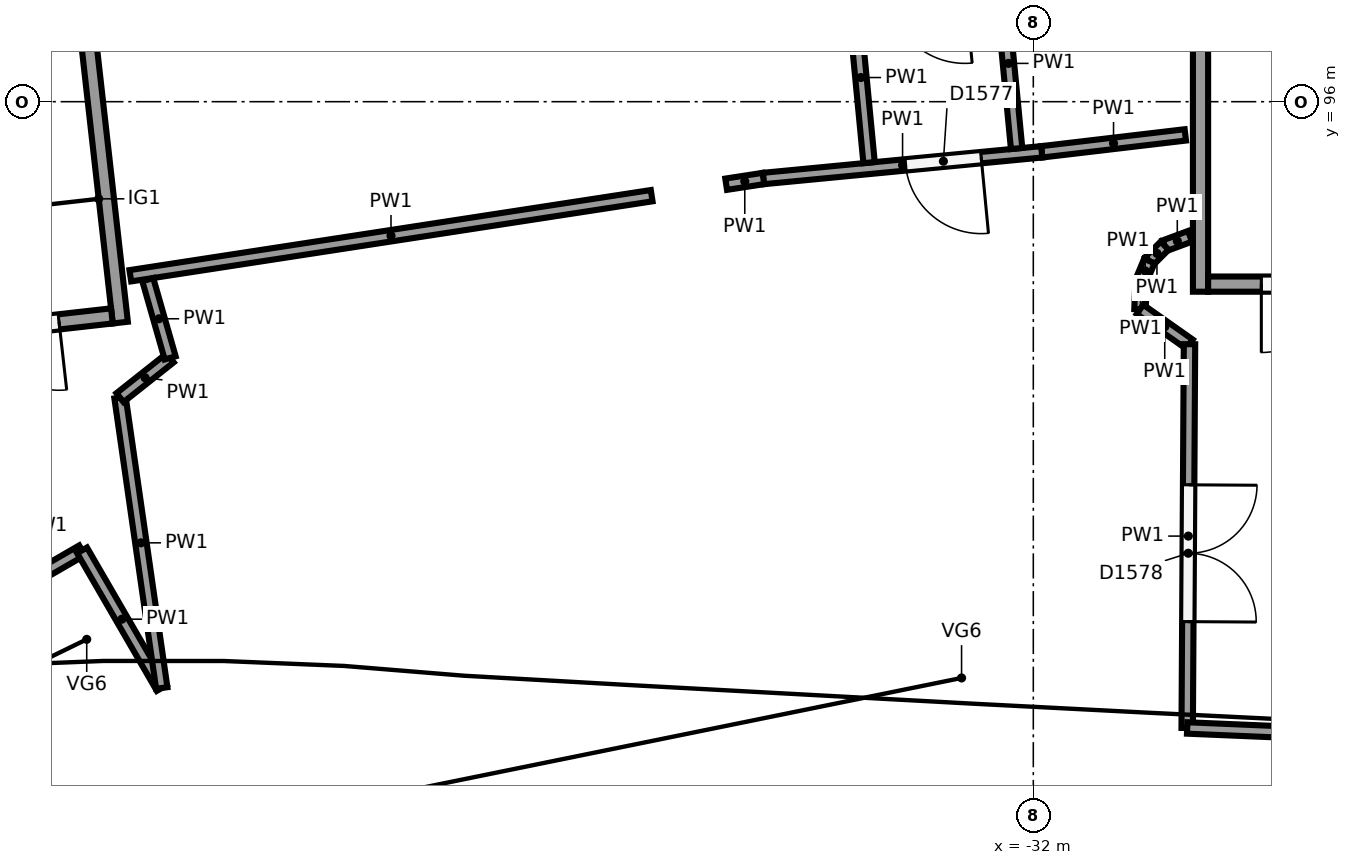
"""IFC4 building model, lengths in metres.
Left out: names, types, materials, properties, quantities, classifications, styles, units other than length and angle.
Written with IfcOpenShell. Run it as: python <this file> out.ifc"""

import sys

from ifc_helpers import new_model, si_unit, direction, frame, frame_2d, origin, origin_2d, place, context, subcontext, project, spatial, rectangle, circle, extrude, element, fill, save


model = new_model("IFC4")
c1 = context("Model", 3, precision=1e-05, world=origin(), true_north=direction((0.0, 1.0)))
c2 = subcontext(c1, "Body", "Model", "MODEL_VIEW")
j1 = project(units=[si_unit("LENGTHUNIT", "METRE"), si_unit("PLANEANGLEUNIT", "RADIAN")], contexts=[c1])
p1 = place(None, origin())
s1 = spatial("IfcSite", under=j1, at=p1, CompositionType="ELEMENT")
p2 = place(p1, origin())
s2 = spatial("IfcBuilding", under=s1, at=p2, CompositionType="ELEMENT")
p3 = place(p2, frame((0.0, 0.0, 24.0)))
s3 = spatial("IfcBuildingStorey", under=s2, at=p3, CompositionType="ELEMENT", Elevation=24.0)
p4 = place(p3, frame((-34.531, 89.912, 0.0), z_axis=(0.0, 0.0, 1.0), x_axis=(1.0, 0.0, 0.0)))
e1 = element("IfcColumn", 1, at=p4, inside=s3, PredefinedType="COLUMN", context=c2, shape_type="SweptSolid", body=[
    extrude(circle(Radius=0.45, at=origin_2d()), origin(), (0.0, 0.0, 1.0), 3.9),
])
p5 = place(p3, frame((-44.683, 91.091, 0.0), z_axis=(0.0, 0.0, 1.0), x_axis=(1.0, 0.0, 0.0)))
e2 = element("IfcColumn", 2, at=p5, inside=s3, PredefinedType="COLUMN", context=c2, shape_type="SweptSolid", body=[
    extrude(circle(Radius=0.55, at=origin_2d()), origin(), (0.0, 0.0, 1.0), 6.0),
])
p6 = place(p3, frame((-29.8, 102.3, 0.0), z_axis=(0.0, 0.0, 1.0), x_axis=(0.0, -1.0, 0.0)))
e3 = element("IfcWall", 3, at=p6, inside=s3, PredefinedType="SHEAR", context=c2, shape_type="SweptSolid", body=[
    extrude(rectangle(XDim=8.8, YDim=0.2, at=frame_2d((4.4, 0.0))), origin(), (0.0, 0.0, 1.0), 5.75),
])
p7 = place(p3, frame((-26.5, 93.6, 0.0), z_axis=(0.0, 0.0, 1.0), x_axis=(-1.0, 0.0, 0.0)))
e4 = element("IfcWall", 4, at=p7, inside=s3, PredefinedType="SHEAR", context=c2, shape_type="SweptSolid", body=[
    extrude(rectangle(XDim=3.2, YDim=0.2, at=frame_2d((1.6, 0.0))), origin(), (0.0, 0.0, 1.0), 5.75),
])
p8 = place(p7, frame((0.7, 0.0, 0.0)))
e5 = element("IfcOpeningElement", 5, at=p8, cuts=e4, PredefinedType="OPENING", context=c2, shape_type="SweptSolid", body=[
    extrude(rectangle(XDim=1.8, YDim=2.1, at=frame_2d((0.9, 1.05))), frame((0.0, 0.11, 0.0), z_axis=(0.0, -1.0, 0.0), x_axis=(1.0, 0.0, 0.0)), (0.0, 0.0, 1.0), 0.22),
])
p9 = place(p3, frame((-44.863, 100.646, 0.0), z_axis=(0.0, 0.0, 1.0), x_axis=(0.111951003472, -0.993713727802, 0.0)))
e6 = element("IfcWall", 6, at=p9, inside=s3, PredefinedType="SHEAR", context=c2, shape_type="SweptSolid", body=[
    extrude(rectangle(XDim=7.6, YDim=0.2, at=frame_2d((3.8, 0.0))), origin(), (0.0, 0.0, 1.0), 5.75),
])
p10 = place(p3, frame((-44.123, 93.182, 0.0), z_axis=(0.0, 0.0, 1.0), x_axis=(-0.993717005286, -0.11192190762, 0.0)))
e7 = element("IfcWall", 7, at=p10, inside=s3, PredefinedType="SHEAR", context=c2, shape_type="SweptSolid", body=[
    extrude(rectangle(XDim=3.2, YDim=0.2, at=frame_2d((1.6, 0.0))), origin(), (0.0, 0.0, 1.0), 5.75),
])
p11 = place(p10, frame((0.7, 0.0, 0.0)))
e8 = element("IfcOpeningElement", 8, at=p11, cuts=e7, PredefinedType="OPENING", context=c2, shape_type="SweptSolid", body=[
    extrude(rectangle(XDim=1.8, YDim=2.1, at=frame_2d((0.9, 1.05))), frame((0.0, 0.11, 0.0), z_axis=(0.0, -1.0, 0.0), x_axis=(1.0, 0.0, 0.0)), (0.0, 0.0, 1.0), 0.22),
])
p12 = place(p3, frame((-30.0, 95.563, 0.0), z_axis=(0.0, 0.0, 1.0), x_axis=(-0.993124293788, -0.117064670536, 0.0)))
e9 = element("IfcWall", 9, at=p12, inside=s3, PredefinedType="PARTITIONING", context=c2, shape_type="SweptSolid", body=[
    extrude(rectangle(XDim=1.902, YDim=0.15, at=frame_2d((0.951, 0.0))), origin(), (0.0, 0.0, 1.0), 5.4),
])
p13 = place(p3, frame((-31.889, 95.34, 0.0), z_axis=(0.0, 0.0, 1.0), x_axis=(-0.995436828667, -0.095422849118, 0.0)))
e10 = element("IfcWall", 10, at=p13, inside=s3, PredefinedType="PARTITIONING", context=c2, shape_type="SweptSolid", body=[
    extrude(rectangle(XDim=3.679, YDim=0.15, at=frame_2d((1.84, 0.0))), origin(), (0.0, 0.0, 1.0), 5.4),
])
p14 = place(p13, frame((0.8, 0.0, 0.0)))
e11 = element("IfcOpeningElement", 11, at=p14, cuts=e10, PredefinedType="OPENING", context=c2, shape_type="SweptSolid", body=[
    extrude(rectangle(XDim=1.0, YDim=2.1, at=frame_2d((0.5, 1.05))), frame((0.0, 0.085, 0.0), z_axis=(0.0, -1.0, 0.0), x_axis=(1.0, 0.0, 0.0)), (0.0, 0.0, 1.0), 0.17),
])
p15 = place(p3, frame((-35.551, 94.989, 0.0), z_axis=(0.0, 0.0, 1.0), x_axis=(-0.988428563691, -0.151687093979, 0.0)))
e12 = element("IfcWall", 12, at=p15, inside=s3, PredefinedType="PARTITIONING", context=c2, shape_type="SweptSolid", body=[
    extrude(rectangle(XDim=0.496, YDim=0.15, at=frame_2d((0.248, 0.0))), origin(), (0.0, 0.0, 1.0), 5.4),
])
p16 = place(p3, frame((-37.021, 94.763, 0.0), z_axis=(0.0, 0.0, 1.0), x_axis=(-0.988411114545, -0.151800753106, 0.0)))
e13 = element("IfcWall", 13, at=p16, inside=s3, PredefinedType="PARTITIONING", context=c2, shape_type="SweptSolid", body=[
    extrude(rectangle(XDim=6.94, YDim=0.15, at=frame_2d((3.47, 0.0))), origin(), (0.0, 0.0, 1.0), 5.4),
])
p17 = place(p3, frame((-29.938, 94.229, 0.0), z_axis=(0.0, 0.0, 1.0), x_axis=(-0.937674325327, -0.347515265308, 0.0)))
e14 = element("IfcWall", 14, at=p17, inside=s3, PredefinedType="PARTITIONING", context=c2, shape_type="SweptSolid", body=[
    extrude(rectangle(XDim=0.356, YDim=0.15, at=frame_2d((0.178, 0.0))), origin(), (0.0, 0.0, 1.0), 5.4),
])
p18 = place(p3, frame((-30.272, 94.105, 0.0), z_axis=(0.0, 0.0, 1.0), x_axis=(-0.707534941396, -0.706678361564, 0.0)))
e15 = element("IfcWall", 15, at=p18, inside=s3, PredefinedType="PARTITIONING", context=c2, shape_type="SweptSolid", body=[
    extrude(rectangle(XDim=0.285, YDim=0.15, at=frame_2d((0.143, 0.0))), origin(), (0.0, 0.0, 1.0), 5.4),
])
p19 = place(p3, frame((-30.474, 93.904, 0.0), z_axis=(0.0, 0.0, 1.0), x_axis=(-0.382275228123, -0.924048510611, 0.0)))
e16 = element("IfcWall", 16, at=p19, inside=s3, PredefinedType="PARTITIONING", context=c2, shape_type="SweptSolid", body=[
    extrude(rectangle(XDim=0.282, YDim=0.15, at=frame_2d((0.141, 0.0))), origin(), (0.0, 0.0, 1.0), 5.4),
])
p20 = place(p3, frame((-30.582, 93.643, 0.0), z_axis=(0.0, 0.0, 1.0), x_axis=(-0.038982051143, -0.999239910977, 0.0)))
e17 = element("IfcWall", 17, at=p20, inside=s3, PredefinedType="PARTITIONING", context=c2, shape_type="SweptSolid", body=[
    extrude(rectangle(XDim=0.376, YDim=0.15, at=frame_2d((0.188, 0.0))), origin(), (0.0, 0.0, 1.0), 5.4),
])
p21 = place(p3, frame((-30.596, 93.268, 0.0), z_axis=(0.0, 0.0, 1.0), x_axis=(0.817630031149, -0.575743981439, 0.0)))
e18 = element("IfcWall", 18, at=p21, inside=s3, PredefinedType="PARTITIONING", context=c2, shape_type="SweptSolid", body=[
    extrude(rectangle(XDim=0.796, YDim=0.15, at=frame_2d((0.398, 0.0))), origin(), (0.0, 0.0, 1.0), 5.4),
])
p22 = place(p3, frame((-29.945, 92.809, 0.0), z_axis=(0.0, 0.0, 1.0), x_axis=(-0.005947670427, -0.999982312452, 0.0)))
e19 = element("IfcWall", 19, at=p22, inside=s3, PredefinedType="PARTITIONING", context=c2, shape_type="SweptSolid", body=[
    extrude(rectangle(XDim=5.049, YDim=0.15, at=frame_2d((2.524, 0.0))), origin(), (0.0, 0.0, 1.0), 5.4),
])
p23 = place(p22, frame((1.85, 0.0, 0.0)))
e20 = element("IfcOpeningElement", 20, at=p23, cuts=e19, PredefinedType="OPENING", context=c2, shape_type="SweptSolid", body=[
    extrude(rectangle(XDim=1.8, YDim=2.1, at=frame_2d((0.9, 1.05))), frame((0.0, 0.085, 0.0), z_axis=(0.0, -1.0, 0.0), x_axis=(1.0, 0.0, 0.0)), (0.0, 0.0, 1.0), 0.17),
])
p24 = place(p3, frame((-29.975, 87.76, 0.0), z_axis=(0.0, 0.0, 1.0), x_axis=(0.999118137172, -0.041987474002, 0.0)))
e21 = element("IfcWall", 21, at=p24, inside=s3, PredefinedType="PARTITIONING", context=c2, shape_type="SweptSolid", body=[
    extrude(rectangle(XDim=12.49, YDim=0.15, at=frame_2d((6.245, 0.0))), origin(), (0.0, 0.0, 1.0), 5.4),
])
p25 = place(p3, frame((-45.468, 89.547, 0.0), z_axis=(0.0, 0.0, 1.0), x_axis=(0.865760373594, 0.500458765049, 0.0)))
e22 = element("IfcWall", 22, at=p25, inside=s3, PredefinedType="PARTITIONING", context=c2, shape_type="SweptSolid", body=[
    extrude(rectangle(XDim=1.1, YDim=0.15, at=frame_2d((0.55, 0.0))), origin(), (0.0, 0.0, 1.0), 5.4),
])
p26 = place(p3, frame((-44.516, 90.097, 0.0), z_axis=(0.0, 0.0, 1.0), x_axis=(0.501068461494, -0.865407647815, 0.0)))
e23 = element("IfcWall", 23, at=p26, inside=s3, PredefinedType="PARTITIONING", context=c2, shape_type="SweptSolid", body=[
    extrude(rectangle(XDim=2.093, YDim=0.15, at=frame_2d((1.046, 0.0))), origin(), (0.0, 0.0, 1.0), 5.4),
])
p27 = place(p3, frame((-43.467, 88.286, 0.0), z_axis=(0.0, 0.0, 1.0), x_axis=(-0.14226260917, 0.989828949886, 0.0)))
e24 = element("IfcWall", 24, at=p27, inside=s3, PredefinedType="PARTITIONING", context=c2, shape_type="SweptSolid", body=[
    extrude(rectangle(XDim=3.86, YDim=0.15, at=frame_2d((1.93, 0.0))), origin(), (0.0, 0.0, 1.0), 5.4),
])
p28 = place(p3, frame((-44.016, 92.106, 0.0), z_axis=(0.0, 0.0, 1.0), x_axis=(0.783745876513, 0.621081637991, 0.0)))
e25 = element("IfcWall", 25, at=p28, inside=s3, PredefinedType="PARTITIONING", context=c2, shape_type="SweptSolid", body=[
    extrude(rectangle(XDim=0.842, YDim=0.15, at=frame_2d((0.421, 0.0))), origin(), (0.0, 0.0, 1.0), 5.4),
])
p29 = place(p3, frame((-43.356, 92.629, 0.0), z_axis=(0.0, 0.0, 1.0), x_axis=(-0.27523308246, 0.961377527467, 0.0)))
e26 = element("IfcWall", 26, at=p29, inside=s3, PredefinedType="PARTITIONING", context=c2, shape_type="SweptSolid", body=[
    extrude(rectangle(XDim=1.071, YDim=0.15, at=frame_2d((0.535, 0.0))), origin(), (0.0, 0.0, 1.0), 5.4),
])
for number, where, z_axis, x_axis in (
    (27, (-32.22, 95.384, 0.0), (0.0, 0.0, 1.0), (-0.095, 0.995, 0.0)),
    (28, (-34.161, 95.198, 0.0), (0.0, 0.0, 1.0), (-0.095, 0.995, 0.0)),
):
    element("IfcWall", number, at=place(p3, frame(where, z_axis=z_axis, x_axis=x_axis)), inside=s3, PredefinedType="PARTITIONING", context=c2, shape_type="SweptSolid", body=[
        extrude(rectangle(XDim=2.25, YDim=0.15, at=frame_2d((1.125, 0.0))), origin(), (0.0, 0.0, 1.0), 5.4),
    ])
p30 = place(p8, origin())
e29 = element("IfcDoor", 29, at=p30, inside=s3, OperationType="DOUBLE_DOOR_SINGLE_SWING", PredefinedType="DOOR", context=c2, shape_type="SweptSolid", body=[
    extrude(rectangle(XDim=1.8, YDim=2.1, at=frame_2d((0.9, 1.05))), frame((0.0, 0.025, 0.0), z_axis=(0.0, -1.0, 0.0), x_axis=(1.0, 0.0, 0.0)), (0.0, 0.0, 1.0), 0.05),
])
fill(e5, e29)
p31 = place(p11, origin())
e30 = element("IfcDoor", 30, at=p31, inside=s3, OperationType="DOUBLE_DOOR_SINGLE_SWING", PredefinedType="DOOR", context=c2, shape_type="SweptSolid", body=[
    extrude(rectangle(XDim=1.8, YDim=2.1, at=frame_2d((0.9, 1.05))), frame((0.0, 0.025, 0.0), z_axis=(0.0, -1.0, 0.0), x_axis=(1.0, 0.0, 0.0)), (0.0, 0.0, 1.0), 0.05),
])
fill(e8, e30)
p32 = place(p14, origin())
e31 = element("IfcDoor", 31, at=p32, inside=s3, OperationType="SINGLE_SWING_LEFT", PredefinedType="DOOR", context=c2, shape_type="SweptSolid", body=[
    extrude(rectangle(XDim=1.0, YDim=2.1, at=frame_2d((0.5, 1.05))), frame((0.0, 0.025, 0.0), z_axis=(0.0, -1.0, 0.0), x_axis=(1.0, 0.0, 0.0)), (0.0, 0.0, 1.0), 0.05),
])
fill(e11, e31)
p33 = place(p23, origin())
e32 = element("IfcDoor", 32, at=p33, inside=s3, OperationType="DOUBLE_DOOR_SINGLE_SWING", PredefinedType="DOOR", context=c2, shape_type="SweptSolid", body=[
    extrude(rectangle(XDim=1.8, YDim=2.1, at=frame_2d((0.9, 1.05))), frame((0.0, 0.025, 0.0), z_axis=(0.0, -1.0, 0.0), x_axis=(1.0, 0.0, 0.0)), (0.0, 0.0, 1.0), 0.05),
])
fill(e20, e32)
save(model, sys.argv[1])
